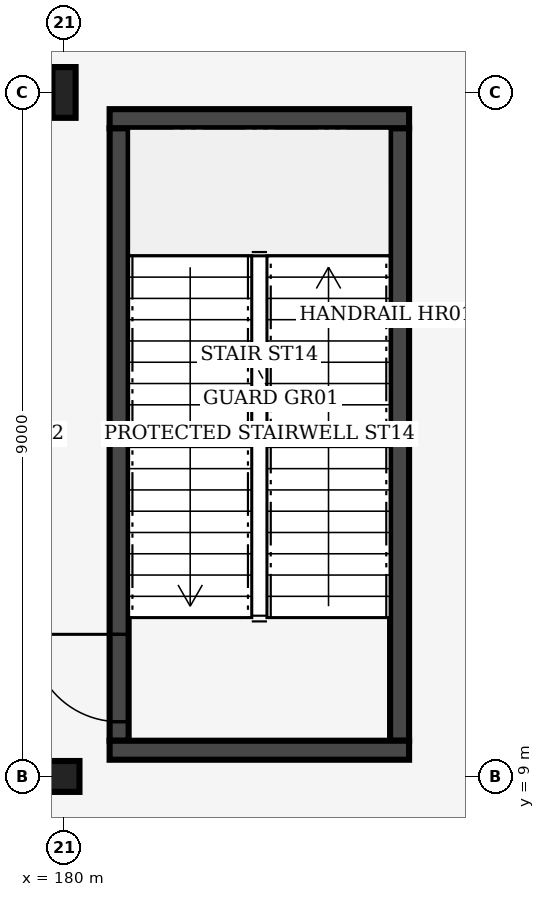
"""IFC4 building model, lengths in metres.
Left out: names, types, materials, properties, quantities, classifications, styles, units other than length and angle.
Written with IfcOpenShell. Run it as: python <this file> out.ifc"""

import sys

from ifc_helpers import new_model, si_unit, direction, frame, frame_2d, origin, origin_2d, place, context, subcontext, project, spatial, rectangle, hollow_circle, i_section, extrude, element, fill, save


model = new_model("IFC4")
c1 = context("Model", 3, precision=1e-05, world=origin(), true_north=direction((0.0, 1.0)))
c2 = subcontext(c1, "Body", "Model", "MODEL_VIEW")
j1 = project(units=[si_unit("LENGTHUNIT", "METRE"), si_unit("PLANEANGLEUNIT", "RADIAN")], contexts=[c1])
p1 = place(None, origin())
s1 = spatial("IfcSite", under=j1, at=p1, CompositionType="ELEMENT")
p2 = place(p1, origin())
s2 = spatial("IfcBuilding", under=s1, at=p2, CompositionType="ELEMENT")
p3 = place(p2, frame((0.0, 0.0, 12.0)))
s3 = spatial("IfcBuildingStorey", under=s2, at=p3, CompositionType="ELEMENT", Elevation=12.0)
p4 = place(p3, frame((180.0, 9.0, 0.0), z_axis=(0.0, 0.0, 1.0), x_axis=(1.0, 0.0, 0.0)))
e1 = element("IfcColumn", 1, at=p4, inside=s3, PredefinedType="COLUMN", context=c2, shape_type="SweptSolid", body=[
    extrude(hollow_circle(Radius=0.203, WallThickness=0.016, at=origin_2d()), origin(), (0.0, 0.0, 1.0), 6.0),
])
p5 = place(p3, frame((180.0, 18.0, 0.0), z_axis=(0.0, 0.0, 1.0), x_axis=(1.0, 0.0, 0.0)))
e2 = element("IfcColumn", 2, at=p5, inside=s3, PredefinedType="COLUMN", context=c2, shape_type="SweptSolid", body=[
    extrude(i_section(OverallWidth=0.305, OverallDepth=0.668, WebThickness=0.021, FlangeThickness=0.04, FilletRadius=0.027, at=origin_2d()), origin(), (0.0, 0.0, 1.0), 6.0),
])
p6 = place(p3, frame((180.725, 9.47, 0.0), z_axis=(0.0, 0.0, 1.0), x_axis=(0.0, 1.0, 0.0)))
e3 = element("IfcWall", 3, at=p6, inside=s3, PredefinedType="SHEAR", context=c2, shape_type="SweptSolid", body=[
    extrude(rectangle(XDim=8.06, YDim=0.25, at=frame_2d((4.03, 0.0))), origin(), (0.0, 0.0, 1.0), 5.61),
])
p7 = place(p6, frame((0.25, 0.0, 0.0)))
e4 = element("IfcOpeningElement", 4, at=p7, cuts=e3, PredefinedType="OPENING", context=c2, shape_type="SweptSolid", body=[
    extrude(rectangle(XDim=1.15, YDim=2.15, at=frame_2d((0.575, 1.075))), frame((0.0, 0.135, 0.0), z_axis=(0.0, -1.0, 0.0), x_axis=(1.0, 0.0, 0.0)), (0.0, 0.0, 1.0), 0.27),
])
p8 = place(p3, frame((184.415, 9.47, 0.0), z_axis=(0.0, 0.0, 1.0), x_axis=(0.0, 1.0, 0.0)))
e5 = element("IfcWall", 5, at=p8, inside=s3, PredefinedType="SHEAR", context=c2, shape_type="SweptSolid", body=[
    extrude(rectangle(XDim=8.06, YDim=0.25, at=frame_2d((4.03, 0.0))), origin(), (0.0, 0.0, 1.0), 5.61),
])
for number, where, z_axis, x_axis in (
    (6, (180.6, 9.345, 0.0), (0.0, 0.0, 1.0), (1.0, 0.0, 0.0)),
    (7, (180.6, 17.655, 0.0), (0.0, 0.0, 1.0), (1.0, 0.0, 0.0)),
):
    element("IfcWall", number, at=place(p3, frame(where, z_axis=z_axis, x_axis=x_axis)), inside=s3, PredefinedType="SHEAR", context=c2, shape_type="SweptSolid", body=[
        extrude(rectangle(XDim=3.94, YDim=0.25, at=frame_2d((1.97, 0.0))), origin(), (0.0, 0.0, 1.0), 5.61),
    ])
p9 = place(p7, origin())
e8 = element("IfcDoor", 8, at=p9, inside=s3, OperationType="SINGLE_SWING_RIGHT", PredefinedType="DOOR", context=c2, shape_type="SweptSolid", body=[
    extrude(rectangle(XDim=1.15, YDim=2.15, at=frame_2d((0.575, 1.075))), frame((0.0, 0.025, 0.0), z_axis=(0.0, -1.0, 0.0), x_axis=(1.0, 0.0, 0.0)), (0.0, 0.0, 1.0), 0.05),
])
fill(e4, e8)
save(model, sys.argv[1])
